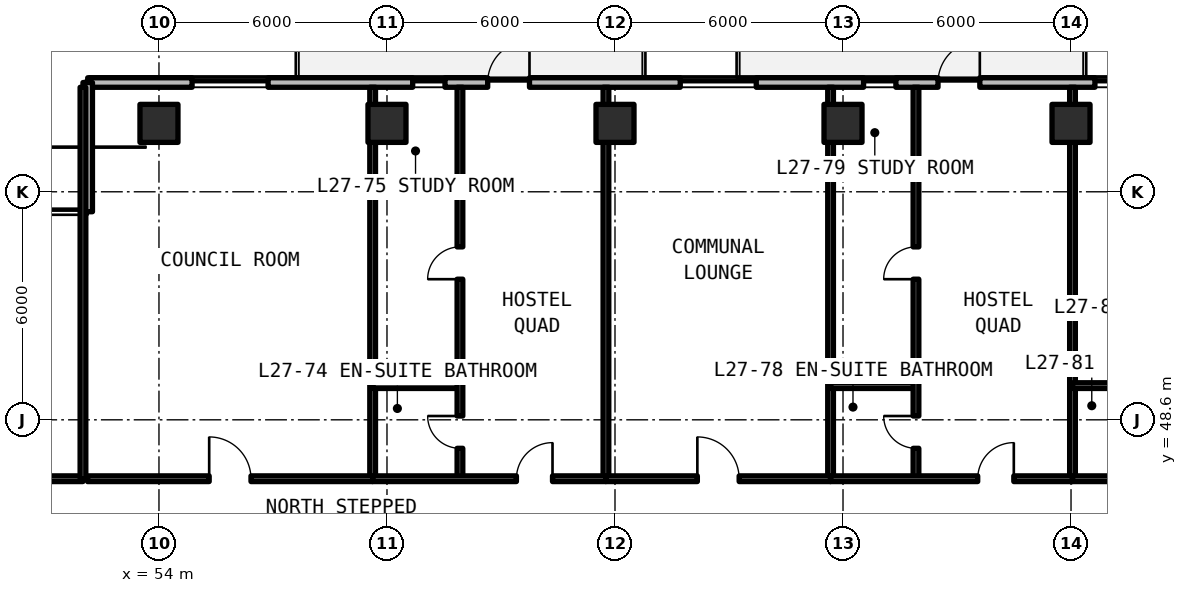
"""IFC4 building model, lengths in metres.
Left out: names, types, materials, properties, quantities, classifications, styles, units other than length and angle.
Written with IfcOpenShell. Run it as: python <this file> out.ifc"""

import sys

from ifc_helpers import new_model, si_unit, direction, frame, frame_2d, origin, origin_2d, place, context, subcontext, project, spatial, rectangle, extrude, element, fill, save


model = new_model("IFC4")
c1 = context("Model", 3, precision=1e-05, world=origin(), true_north=direction((0.0, 1.0)))
c2 = subcontext(c1, "Body", "Model", "MODEL_VIEW")
j1 = project(units=[si_unit("LENGTHUNIT", "METRE"), si_unit("PLANEANGLEUNIT", "RADIAN")], contexts=[c1])
p1 = place(None, origin())
s1 = spatial("IfcSite", under=j1, at=p1, CompositionType="ELEMENT")
p2 = place(p1, origin())
s2 = spatial("IfcBuilding", under=s1, at=p2, CompositionType="ELEMENT")
p3 = place(p2, frame((0.0, 0.0, 98.67)))
s3 = spatial("IfcBuildingStorey", under=s2, at=p3, CompositionType="ELEMENT", Elevation=98.67)
for number, where, z_axis, x_axis in (
    (1, (54.0, 56.4, 0.0), (0.0, 0.0, 1.0), (1.0, 0.0, 0.0)),
    (2, (60.0, 56.4, 0.0), (0.0, 0.0, 1.0), (1.0, 0.0, 0.0)),
    (3, (66.0, 56.4, 0.0), (0.0, 0.0, 1.0), (1.0, 0.0, 0.0)),
    (4, (72.0, 56.4, 0.0), (0.0, 0.0, 1.0), (1.0, 0.0, 0.0)),
    (5, (78.0, 56.4, 0.0), (0.0, 0.0, 1.0), (1.0, 0.0, 0.0)),
):
    element("IfcColumn", number, at=place(p3, frame(where, z_axis=z_axis, x_axis=x_axis)), inside=s3, PredefinedType="COLUMN", context=c2, shape_type="SweptSolid", body=[
        extrude(rectangle(XDim=1.0, YDim=1.0, at=origin_2d()), origin(), (0.0, 0.0, 1.0), 3.3),
    ])
p4 = place(p3, frame((96.148, 57.475, 0.0), z_axis=(0.0, 0.0, 1.0), x_axis=(-1.0, 0.0, 0.0)))
e6 = element("IfcWall", 6, at=p4, inside=s3, PredefinedType="SOLIDWALL", context=c2, shape_type="SweptSolid", body=[
    extrude(rectangle(XDim=44.023, YDim=0.25, at=frame_2d((22.012, 0.0))), origin(), (0.0, 0.0, 1.0), 3.08),
])
p5 = place(p4, frame((32.398, 0.0, 0.0)))
e7 = element("IfcOpeningElement", 7, at=p5, cuts=e6, PredefinedType="OPENING", context=c2, shape_type="SweptSolid", body=[
    extrude(rectangle(XDim=1.1, YDim=2.15, at=frame_2d((0.55, 1.075))), frame((0.0, 0.135, 0.0), z_axis=(0.0, -1.0, 0.0), x_axis=(1.0, 0.0, 0.0)), (0.0, 0.0, 1.0), 0.27),
])
p6 = place(p4, frame((20.548, 0.0, 0.0)))
e8 = element("IfcOpeningElement", 8, at=p6, cuts=e6, PredefinedType="OPENING", context=c2, shape_type="SweptSolid", body=[
    extrude(rectangle(XDim=1.1, YDim=2.15, at=frame_2d((0.55, 1.075))), frame((0.0, 0.135, 0.0), z_axis=(0.0, -1.0, 0.0), x_axis=(1.0, 0.0, 0.0)), (0.0, 0.0, 1.0), 0.27),
])
p7 = place(p4, frame((8.448, 0.0, 0.0)))
e9 = element("IfcOpeningElement", 9, at=p7, cuts=e6, PredefinedType="OPENING", context=c2, shape_type="SweptSolid", body=[
    extrude(rectangle(XDim=1.1, YDim=2.15, at=frame_2d((0.55, 1.075))), frame((0.0, 0.135, 0.0), z_axis=(0.0, -1.0, 0.0), x_axis=(1.0, 0.0, 0.0)), (0.0, 0.0, 1.0), 0.27),
])
p8 = place(p4, frame((39.277, 0.0, 0.78)))
e10 = element("IfcOpeningElement", 10, at=p8, cuts=e6, PredefinedType="OPENING", context=c2, shape_type="SweptSolid", body=[
    extrude(rectangle(XDim=2.0, YDim=1.66, at=frame_2d((1.0, 0.83))), frame((0.0, 0.135, 0.0), z_axis=(0.0, -1.0, 0.0), x_axis=(1.0, 0.0, 0.0)), (0.0, 0.0, 1.0), 0.27),
])
p9 = place(p4, frame((34.622, 0.0, 0.78)))
e11 = element("IfcOpeningElement", 11, at=p9, cuts=e6, PredefinedType="OPENING", context=c2, shape_type="SweptSolid", body=[
    extrude(rectangle(XDim=0.85, YDim=1.65, at=frame_2d((0.425, 0.825))), frame((0.0, 0.135, 0.0), z_axis=(0.0, -1.0, 0.0), x_axis=(1.0, 0.0, 0.0)), (0.0, 0.0, 1.0), 0.27),
])
p10 = place(p4, frame((26.431, 0.0, 0.78)))
e12 = element("IfcOpeningElement", 12, at=p10, cuts=e6, PredefinedType="OPENING", context=c2, shape_type="SweptSolid", body=[
    extrude(rectangle(XDim=2.0, YDim=1.66, at=frame_2d((1.0, 0.83))), frame((0.0, 0.135, 0.0), z_axis=(0.0, -1.0, 0.0), x_axis=(1.0, 0.0, 0.0)), (0.0, 0.0, 1.0), 0.27),
])
p11 = place(p4, frame((22.757, 0.0, 0.78)))
e13 = element("IfcOpeningElement", 13, at=p11, cuts=e6, PredefinedType="OPENING", context=c2, shape_type="SweptSolid", body=[
    extrude(rectangle(XDim=0.85, YDim=1.65, at=frame_2d((0.425, 0.825))), frame((0.0, 0.135, 0.0), z_axis=(0.0, -1.0, 0.0), x_axis=(1.0, 0.0, 0.0)), (0.0, 0.0, 1.0), 0.27),
])
p12 = place(p4, frame((16.669, 0.0, 0.78)))
e14 = element("IfcOpeningElement", 14, at=p12, cuts=e6, PredefinedType="OPENING", context=c2, shape_type="SweptSolid", body=[
    extrude(rectangle(XDim=0.85, YDim=1.65, at=frame_2d((0.425, 0.825))), frame((0.0, 0.135, 0.0), z_axis=(0.0, -1.0, 0.0), x_axis=(1.0, 0.0, 0.0)), (0.0, 0.0, 1.0), 0.27),
])
p13 = place(p4, frame((13.159, 0.0, 0.78)))
e15 = element("IfcOpeningElement", 15, at=p13, cuts=e6, PredefinedType="OPENING", context=c2, shape_type="SweptSolid", body=[
    extrude(rectangle(XDim=2.0, YDim=1.66, at=frame_2d((1.0, 0.83))), frame((0.0, 0.135, 0.0), z_axis=(0.0, -1.0, 0.0), x_axis=(1.0, 0.0, 0.0)), (0.0, 0.0, 1.0), 0.27),
])
p14 = place(p4, frame((10.56, 0.0, 0.78)))
e16 = element("IfcOpeningElement", 16, at=p14, cuts=e6, PredefinedType="OPENING", context=c2, shape_type="SweptSolid", body=[
    extrude(rectangle(XDim=0.85, YDim=1.65, at=frame_2d((0.425, 0.825))), frame((0.0, 0.135, 0.0), z_axis=(0.0, -1.0, 0.0), x_axis=(1.0, 0.0, 0.0)), (0.0, 0.0, 1.0), 0.27),
])
p15 = place(p4, frame((4.619, 0.0, 0.78)))
e17 = element("IfcOpeningElement", 17, at=p15, cuts=e6, PredefinedType="OPENING", context=c2, shape_type="SweptSolid", body=[
    extrude(rectangle(XDim=0.85, YDim=1.65, at=frame_2d((0.425, 0.825))), frame((0.0, 0.135, 0.0), z_axis=(0.0, -1.0, 0.0), x_axis=(1.0, 0.0, 0.0)), (0.0, 0.0, 1.0), 0.27),
])
p16 = place(p4, frame((1.109, 0.0, 0.78)))
e18 = element("IfcOpeningElement", 18, at=p16, cuts=e6, PredefinedType="OPENING", context=c2, shape_type="SweptSolid", body=[
    extrude(rectangle(XDim=2.0, YDim=1.66, at=frame_2d((1.0, 0.83))), frame((0.0, 0.135, 0.0), z_axis=(0.0, -1.0, 0.0), x_axis=(1.0, 0.0, 0.0)), (0.0, 0.0, 1.0), 0.27),
])
p17 = place(p3, frame((52.125, 57.475, 0.0), z_axis=(0.0, 0.0, 1.0), x_axis=(0.0, -1.0, 0.0)))
e19 = element("IfcWall", 19, at=p17, inside=s3, PredefinedType="SOLIDWALL", context=c2, shape_type="SweptSolid", body=[
    extrude(rectangle(XDim=3.4, YDim=0.25, at=frame_2d((1.7, 0.0))), origin(), (0.0, 0.0, 1.0), 3.08),
])
p18 = place(p3, frame((43.6, 47.05, 0.0), z_axis=(0.0, 0.0, 1.0), x_axis=(1.0, 0.0, 0.0)))
e20 = element("IfcWall", 20, at=p18, inside=s3, PredefinedType="SOLIDWALL", context=c2, shape_type="SweptSolid", body=[
    extrude(rectangle(XDim=8.4, YDim=0.15, at=frame_2d((4.2, 0.0))), origin(), (0.0, 0.0, 1.0), 2.35),
])
p19 = place(p18, frame((3.65, 0.0, 0.0)))
e21 = element("IfcOpeningElement", 21, at=p19, cuts=e20, PredefinedType="OPENING", context=c2, shape_type="SweptSolid", body=[
    extrude(rectangle(XDim=1.1, YDim=2.15, at=frame_2d((0.55, 1.075))), frame((0.0, 0.085, 0.0), z_axis=(0.0, -1.0, 0.0), x_axis=(1.0, 0.0, 0.0)), (0.0, 0.0, 1.0), 0.17),
])
for number, where, z_axis, x_axis in (
    (22, (52.0, 47.05, 0.0), (0.0, 0.0, 1.0), (0.0, 1.0, 0.0)),
    (23, (59.623, 47.05, 0.0), (0.0, 0.0, 1.0), (0.0, 1.0, 0.0)),
):
    element("IfcWall", number, at=place(p3, frame(where, z_axis=z_axis, x_axis=x_axis)), inside=s3, PredefinedType="SOLIDWALL", context=c2, shape_type="SweptSolid", body=[
        extrude(rectangle(XDim=10.3, YDim=0.15, at=frame_2d((5.15, 0.0))), origin(), (0.0, 0.0, 1.0), 2.35),
    ])
p20 = place(p3, frame((52.12, 47.05, 0.0), z_axis=(0.0, 0.0, 1.0), x_axis=(1.0, 0.0, 0.0)))
e24 = element("IfcWall", 24, at=p20, inside=s3, PredefinedType="SOLIDWALL", context=c2, shape_type="SweptSolid", body=[
    extrude(rectangle(XDim=7.503, YDim=0.15, at=frame_2d((3.751, 0.0))), origin(), (0.0, 0.0, 1.0), 2.35),
])
p21 = place(p20, frame((3.201, 0.0, 0.0)))
e25 = element("IfcOpeningElement", 25, at=p21, cuts=e24, PredefinedType="OPENING", context=c2, shape_type="SweptSolid", body=[
    extrude(rectangle(XDim=1.1, YDim=2.15, at=frame_2d((0.55, 1.075))), frame((0.0, 0.085, 0.0), z_axis=(0.0, -1.0, 0.0), x_axis=(1.0, 0.0, 0.0)), (0.0, 0.0, 1.0), 0.17),
])
p22 = place(p3, frame((65.761, 47.05, 0.0), z_axis=(0.0, 0.0, 1.0), x_axis=(0.0, 1.0, 0.0)))
e26 = element("IfcWall", 26, at=p22, inside=s3, PredefinedType="SOLIDWALL", context=c2, shape_type="SweptSolid", body=[
    extrude(rectangle(XDim=10.3, YDim=0.15, at=frame_2d((5.15, 0.0))), origin(), (0.0, 0.0, 1.0), 2.35),
])
p23 = place(p3, frame((59.623, 49.5, 0.0), z_axis=(0.0, 0.0, 1.0), x_axis=(1.0, 0.0, 0.0)))
e27 = element("IfcWall", 27, at=p23, inside=s3, PredefinedType="PARTITIONING", context=c2, shape_type="SweptSolid", body=[
    extrude(rectangle(XDim=2.297, YDim=0.15, at=frame_2d((1.148, 0.0))), origin(), (0.0, 0.0, 1.0), 2.35),
])
p24 = place(p3, frame((61.92, 47.05, 0.0), z_axis=(0.0, 0.0, 1.0), x_axis=(0.0, 1.0, 0.0)))
e28 = element("IfcWall", 28, at=p24, inside=s3, PredefinedType="PARTITIONING", context=c2, shape_type="SweptSolid", body=[
    extrude(rectangle(XDim=10.3, YDim=0.15, at=frame_2d((5.15, 0.0))), origin(), (0.0, 0.0, 1.0), 2.35),
])
p25 = place(p24, frame((0.8, 0.0, 0.0)))
e29 = element("IfcOpeningElement", 29, at=p25, cuts=e28, PredefinedType="OPENING", context=c2, shape_type="SweptSolid", body=[
    extrude(rectangle(XDim=0.85, YDim=2.1, at=frame_2d((0.425, 1.05))), frame((0.0, 0.085, 0.0), z_axis=(0.0, -1.0, 0.0), x_axis=(1.0, 0.0, 0.0)), (0.0, 0.0, 1.0), 0.17),
])
p26 = place(p24, frame((5.25, 0.0, 0.0)))
e30 = element("IfcOpeningElement", 30, at=p26, cuts=e28, PredefinedType="OPENING", context=c2, shape_type="SweptSolid", body=[
    extrude(rectangle(XDim=0.85, YDim=2.1, at=frame_2d((0.425, 1.05))), frame((0.0, 0.085, 0.0), z_axis=(0.0, -1.0, 0.0), x_axis=(1.0, 0.0, 0.0)), (0.0, 0.0, 1.0), 0.17),
])
p27 = place(p3, frame((59.623, 47.05, 0.0), z_axis=(0.0, 0.0, 1.0), x_axis=(1.0, 0.0, 0.0)))
e31 = element("IfcWall", 31, at=p27, inside=s3, PredefinedType="SOLIDWALL", context=c2, shape_type="SweptSolid", body=[
    extrude(rectangle(XDim=6.139, YDim=0.15, at=frame_2d((3.069, 0.0))), origin(), (0.0, 0.0, 1.0), 2.35),
])
p28 = place(p27, frame((3.783, 0.0, 0.0)))
e32 = element("IfcOpeningElement", 32, at=p28, cuts=e31, PredefinedType="OPENING", context=c2, shape_type="SweptSolid", body=[
    extrude(rectangle(XDim=0.95, YDim=2.15, at=frame_2d((0.475, 1.075))), frame((0.0, 0.085, 0.0), z_axis=(0.0, -1.0, 0.0), x_axis=(1.0, 0.0, 0.0)), (0.0, 0.0, 1.0), 0.17),
])
p29 = place(p3, frame((71.673, 47.05, 0.0), z_axis=(0.0, 0.0, 1.0), x_axis=(0.0, 1.0, 0.0)))
e33 = element("IfcWall", 33, at=p29, inside=s3, PredefinedType="SOLIDWALL", context=c2, shape_type="SweptSolid", body=[
    extrude(rectangle(XDim=10.3, YDim=0.15, at=frame_2d((5.15, 0.0))), origin(), (0.0, 0.0, 1.0), 2.35),
])
p30 = place(p3, frame((65.761, 47.05, 0.0), z_axis=(0.0, 0.0, 1.0), x_axis=(1.0, 0.0, 0.0)))
e34 = element("IfcWall", 34, at=p30, inside=s3, PredefinedType="SOLIDWALL", context=c2, shape_type="SweptSolid", body=[
    extrude(rectangle(XDim=5.911, YDim=0.15, at=frame_2d((2.956, 0.0))), origin(), (0.0, 0.0, 1.0), 2.35),
])
p31 = place(p30, frame((2.406, 0.0, 0.0)))
e35 = element("IfcOpeningElement", 35, at=p31, cuts=e34, PredefinedType="OPENING", context=c2, shape_type="SweptSolid", body=[
    extrude(rectangle(XDim=1.1, YDim=2.15, at=frame_2d((0.55, 1.075))), frame((0.0, 0.085, 0.0), z_axis=(0.0, -1.0, 0.0), x_axis=(1.0, 0.0, 0.0)), (0.0, 0.0, 1.0), 0.17),
])
p32 = place(p3, frame((78.039, 47.05, 0.0), z_axis=(0.0, 0.0, 1.0), x_axis=(0.0, 1.0, 0.0)))
e36 = element("IfcWall", 36, at=p32, inside=s3, PredefinedType="SOLIDWALL", context=c2, shape_type="SweptSolid", body=[
    extrude(rectangle(XDim=10.3, YDim=0.15, at=frame_2d((5.15, 0.0))), origin(), (0.0, 0.0, 1.0), 2.35),
])
p33 = place(p3, frame((71.673, 49.5, 0.0), z_axis=(0.0, 0.0, 1.0), x_axis=(1.0, 0.0, 0.0)))
e37 = element("IfcWall", 37, at=p33, inside=s3, PredefinedType="PARTITIONING", context=c2, shape_type="SweptSolid", body=[
    extrude(rectangle(XDim=2.247, YDim=0.15, at=frame_2d((1.124, 0.0))), origin(), (0.0, 0.0, 1.0), 2.35),
])
p34 = place(p3, frame((73.92, 47.05, 0.0), z_axis=(0.0, 0.0, 1.0), x_axis=(0.0, 1.0, 0.0)))
e38 = element("IfcWall", 38, at=p34, inside=s3, PredefinedType="PARTITIONING", context=c2, shape_type="SweptSolid", body=[
    extrude(rectangle(XDim=10.3, YDim=0.15, at=frame_2d((5.15, 0.0))), origin(), (0.0, 0.0, 1.0), 2.35),
])
p35 = place(p34, frame((0.8, 0.0, 0.0)))
e39 = element("IfcOpeningElement", 39, at=p35, cuts=e38, PredefinedType="OPENING", context=c2, shape_type="SweptSolid", body=[
    extrude(rectangle(XDim=0.85, YDim=2.1, at=frame_2d((0.425, 1.05))), frame((0.0, 0.085, 0.0), z_axis=(0.0, -1.0, 0.0), x_axis=(1.0, 0.0, 0.0)), (0.0, 0.0, 1.0), 0.17),
])
p36 = place(p34, frame((5.25, 0.0, 0.0)))
e40 = element("IfcOpeningElement", 40, at=p36, cuts=e38, PredefinedType="OPENING", context=c2, shape_type="SweptSolid", body=[
    extrude(rectangle(XDim=0.85, YDim=2.1, at=frame_2d((0.425, 1.05))), frame((0.0, 0.085, 0.0), z_axis=(0.0, -1.0, 0.0), x_axis=(1.0, 0.0, 0.0)), (0.0, 0.0, 1.0), 0.17),
])
p37 = place(p3, frame((71.673, 47.05, 0.0), z_axis=(0.0, 0.0, 1.0), x_axis=(1.0, 0.0, 0.0)))
e41 = element("IfcWall", 41, at=p37, inside=s3, PredefinedType="SOLIDWALL", context=c2, shape_type="SweptSolid", body=[
    extrude(rectangle(XDim=6.366, YDim=0.15, at=frame_2d((3.183, 0.0))), origin(), (0.0, 0.0, 1.0), 2.35),
])
p38 = place(p37, frame((3.872, 0.0, 0.0)))
e42 = element("IfcOpeningElement", 42, at=p38, cuts=e41, PredefinedType="OPENING", context=c2, shape_type="SweptSolid", body=[
    extrude(rectangle(XDim=0.95, YDim=2.15, at=frame_2d((0.475, 1.075))), frame((0.0, 0.085, 0.0), z_axis=(0.0, -1.0, 0.0), x_axis=(1.0, 0.0, 0.0)), (0.0, 0.0, 1.0), 0.17),
])
p39 = place(p3, frame((78.039, 49.5, 0.0), z_axis=(0.0, 0.0, 1.0), x_axis=(1.0, 0.0, 0.0)))
e43 = element("IfcWall", 43, at=p39, inside=s3, PredefinedType="PARTITIONING", context=c2, shape_type="SweptSolid", body=[
    extrude(rectangle(XDim=2.01, YDim=0.15, at=frame_2d((1.005, 0.0))), origin(), (0.0, 0.0, 1.0), 2.35),
])
p40 = place(p3, frame((78.039, 47.05, 0.0), z_axis=(0.0, 0.0, 1.0), x_axis=(1.0, 0.0, 0.0)))
e44 = element("IfcWall", 44, at=p40, inside=s3, PredefinedType="SOLIDWALL", context=c2, shape_type="SweptSolid", body=[
    extrude(rectangle(XDim=5.911, YDim=0.15, at=frame_2d((2.956, 0.0))), origin(), (0.0, 0.0, 1.0), 2.35),
])
p41 = place(p40, frame((3.526, 0.0, 0.0)))
e45 = element("IfcOpeningElement", 45, at=p41, cuts=e44, PredefinedType="OPENING", context=c2, shape_type="SweptSolid", body=[
    extrude(rectangle(XDim=0.95, YDim=2.15, at=frame_2d((0.475, 1.075))), frame((0.0, 0.085, 0.0), z_axis=(0.0, -1.0, 0.0), x_axis=(1.0, 0.0, 0.0)), (0.0, 0.0, 1.0), 0.17),
])
p42 = place(p5, frame((1.1, 0.0, 0.0), z_axis=(0.0, 0.0, 1.0), x_axis=(-1.0, 0.0, 0.0)))
e46 = element("IfcDoor", 46, at=p42, inside=s3, OperationType="SINGLE_SWING_RIGHT", PredefinedType="DOOR", context=c2, shape_type="SweptSolid", body=[
    extrude(rectangle(XDim=1.1, YDim=2.15, at=frame_2d((0.55, 1.075))), frame((0.0, 0.025, 0.0), z_axis=(0.0, -1.0, 0.0), x_axis=(1.0, 0.0, 0.0)), (0.0, 0.0, 1.0), 0.05),
])
fill(e7, e46)
p43 = place(p6, frame((1.1, 0.0, 0.0), z_axis=(0.0, 0.0, 1.0), x_axis=(-1.0, 0.0, 0.0)))
e47 = element("IfcDoor", 47, at=p43, inside=s3, OperationType="SINGLE_SWING_LEFT", PredefinedType="DOOR", context=c2, shape_type="SweptSolid", body=[
    extrude(rectangle(XDim=1.1, YDim=2.15, at=frame_2d((0.55, 1.075))), frame((0.0, 0.025, 0.0), z_axis=(0.0, -1.0, 0.0), x_axis=(1.0, 0.0, 0.0)), (0.0, 0.0, 1.0), 0.05),
])
fill(e8, e47)
p44 = place(p8, origin())
e48 = element("IfcWindow", 48, at=p44, inside=s3, PartitioningType="SINGLE_PANEL", PredefinedType="WINDOW", context=c2, shape_type="SweptSolid", body=[
    extrude(rectangle(XDim=2.0, YDim=1.66, at=frame_2d((1.0, 0.83))), frame((0.0, 0.03, 0.0), z_axis=(0.0, -1.0, 0.0), x_axis=(1.0, 0.0, 0.0)), (0.0, 0.0, 1.0), 0.06),
])
fill(e10, e48)
p45 = place(p9, origin())
e49 = element("IfcWindow", 49, at=p45, inside=s3, PartitioningType="SINGLE_PANEL", PredefinedType="WINDOW", context=c2, shape_type="SweptSolid", body=[
    extrude(rectangle(XDim=0.85, YDim=1.65, at=frame_2d((0.425, 0.825))), frame((0.0, 0.03, 0.0), z_axis=(0.0, -1.0, 0.0), x_axis=(1.0, 0.0, 0.0)), (0.0, 0.0, 1.0), 0.06),
])
fill(e11, e49)
p46 = place(p10, origin())
e50 = element("IfcWindow", 50, at=p46, inside=s3, PartitioningType="SINGLE_PANEL", PredefinedType="WINDOW", context=c2, shape_type="SweptSolid", body=[
    extrude(rectangle(XDim=2.0, YDim=1.66, at=frame_2d((1.0, 0.83))), frame((0.0, 0.03, 0.0), z_axis=(0.0, -1.0, 0.0), x_axis=(1.0, 0.0, 0.0)), (0.0, 0.0, 1.0), 0.06),
])
fill(e12, e50)
p47 = place(p11, origin())
e51 = element("IfcWindow", 51, at=p47, inside=s3, PartitioningType="SINGLE_PANEL", PredefinedType="WINDOW", context=c2, shape_type="SweptSolid", body=[
    extrude(rectangle(XDim=0.85, YDim=1.65, at=frame_2d((0.425, 0.825))), frame((0.0, 0.03, 0.0), z_axis=(0.0, -1.0, 0.0), x_axis=(1.0, 0.0, 0.0)), (0.0, 0.0, 1.0), 0.06),
])
fill(e13, e51)
p48 = place(p12, origin())
e52 = element("IfcWindow", 52, at=p48, inside=s3, PartitioningType="SINGLE_PANEL", PredefinedType="WINDOW", context=c2, shape_type="SweptSolid", body=[
    extrude(rectangle(XDim=0.85, YDim=1.65, at=frame_2d((0.425, 0.825))), frame((0.0, 0.03, 0.0), z_axis=(0.0, -1.0, 0.0), x_axis=(1.0, 0.0, 0.0)), (0.0, 0.0, 1.0), 0.06),
])
fill(e14, e52)
p49 = place(p21, origin())
e53 = element("IfcDoor", 53, at=p49, inside=s3, OperationType="SINGLE_SWING_LEFT", PredefinedType="DOOR", context=c2, shape_type="SweptSolid", body=[
    extrude(rectangle(XDim=1.1, YDim=2.15, at=frame_2d((0.55, 1.075))), frame((0.0, 0.025, 0.0), z_axis=(0.0, -1.0, 0.0), x_axis=(1.0, 0.0, 0.0)), (0.0, 0.0, 1.0), 0.05),
])
fill(e25, e53)
p50 = place(p25, origin())
e54 = element("IfcDoor", 54, at=p50, inside=s3, OperationType="SINGLE_SWING_RIGHT", PredefinedType="DOOR", context=c2, shape_type="SweptSolid", body=[
    extrude(rectangle(XDim=0.85, YDim=2.1, at=frame_2d((0.425, 1.05))), frame((0.0, 0.025, 0.0), z_axis=(0.0, -1.0, 0.0), x_axis=(1.0, 0.0, 0.0)), (0.0, 0.0, 1.0), 0.05),
])
fill(e29, e54)
p51 = place(p26, origin())
e55 = element("IfcDoor", 55, at=p51, inside=s3, OperationType="SINGLE_SWING_LEFT", PredefinedType="DOOR", context=c2, shape_type="SweptSolid", body=[
    extrude(rectangle(XDim=0.85, YDim=2.1, at=frame_2d((0.425, 1.05))), frame((0.0, 0.025, 0.0), z_axis=(0.0, -1.0, 0.0), x_axis=(1.0, 0.0, 0.0)), (0.0, 0.0, 1.0), 0.05),
])
fill(e30, e55)
p52 = place(p28, origin())
e56 = element("IfcDoor", 56, at=p52, inside=s3, OperationType="SINGLE_SWING_RIGHT", PredefinedType="DOOR", context=c2, shape_type="SweptSolid", body=[
    extrude(rectangle(XDim=0.95, YDim=2.15, at=frame_2d((0.475, 1.075))), frame((0.0, 0.025, 0.0), z_axis=(0.0, -1.0, 0.0), x_axis=(1.0, 0.0, 0.0)), (0.0, 0.0, 1.0), 0.05),
])
fill(e32, e56)
p53 = place(p31, origin())
e57 = element("IfcDoor", 57, at=p53, inside=s3, OperationType="SINGLE_SWING_LEFT", PredefinedType="DOOR", context=c2, shape_type="SweptSolid", body=[
    extrude(rectangle(XDim=1.1, YDim=2.15, at=frame_2d((0.55, 1.075))), frame((0.0, 0.025, 0.0), z_axis=(0.0, -1.0, 0.0), x_axis=(1.0, 0.0, 0.0)), (0.0, 0.0, 1.0), 0.05),
])
fill(e35, e57)
p54 = place(p35, origin())
e58 = element("IfcDoor", 58, at=p54, inside=s3, OperationType="SINGLE_SWING_RIGHT", PredefinedType="DOOR", context=c2, shape_type="SweptSolid", body=[
    extrude(rectangle(XDim=0.85, YDim=2.1, at=frame_2d((0.425, 1.05))), frame((0.0, 0.025, 0.0), z_axis=(0.0, -1.0, 0.0), x_axis=(1.0, 0.0, 0.0)), (0.0, 0.0, 1.0), 0.05),
])
fill(e39, e58)
p55 = place(p36, origin())
e59 = element("IfcDoor", 59, at=p55, inside=s3, OperationType="SINGLE_SWING_LEFT", PredefinedType="DOOR", context=c2, shape_type="SweptSolid", body=[
    extrude(rectangle(XDim=0.85, YDim=2.1, at=frame_2d((0.425, 1.05))), frame((0.0, 0.025, 0.0), z_axis=(0.0, -1.0, 0.0), x_axis=(1.0, 0.0, 0.0)), (0.0, 0.0, 1.0), 0.05),
])
fill(e40, e59)
p56 = place(p38, origin())
e60 = element("IfcDoor", 60, at=p56, inside=s3, OperationType="SINGLE_SWING_RIGHT", PredefinedType="DOOR", context=c2, shape_type="SweptSolid", body=[
    extrude(rectangle(XDim=0.95, YDim=2.15, at=frame_2d((0.475, 1.075))), frame((0.0, 0.025, 0.0), z_axis=(0.0, -1.0, 0.0), x_axis=(1.0, 0.0, 0.0)), (0.0, 0.0, 1.0), 0.05),
])
fill(e42, e60)
save(model, sys.argv[1])
